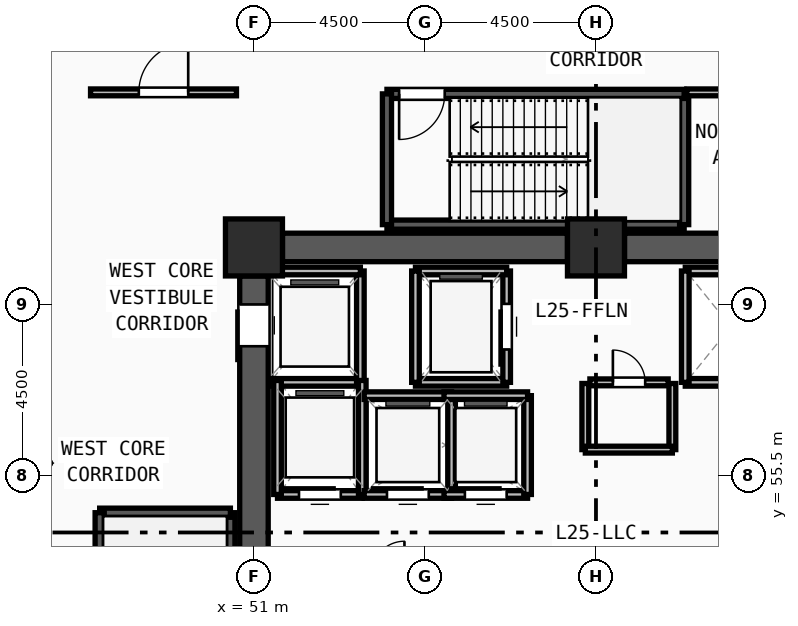
"""IFC4 building model, lengths in metres.
Left out: names, types, materials, properties, quantities, classifications, styles, units other than length and angle.
Written with IfcOpenShell. Run it as: python <this file> out.ifc"""

import sys

from ifc_helpers import new_model, si_unit, direction, frame, frame_2d, origin, origin_2d, place, context, subcontext, project, spatial, rectangle, extrude, source, transform, mapped, element, fill, save


model = new_model("IFC4")
c1 = context("Model", 3, precision=1e-05, world=origin(), true_north=direction((0.0, 1.0)))
c2 = subcontext(c1, "Body", "Model", "MODEL_VIEW")
j1 = project(units=[si_unit("LENGTHUNIT", "METRE"), si_unit("PLANEANGLEUNIT", "RADIAN")], contexts=[c1])
p1 = place(None, origin())
s1 = spatial("IfcSite", under=j1, at=p1, CompositionType="ELEMENT")
p2 = place(p1, origin())
s2 = spatial("IfcBuilding", under=s1, at=p2, CompositionType="ELEMENT")
p3 = place(p2, frame((0.0, 0.0, 97.5)))
s3 = spatial("IfcBuildingStorey", under=s2, at=p3, CompositionType="ELEMENT", Elevation=97.5)
m1 = source(origin(), c2, "Body", "SweptSolid", [
    extrude(rectangle(XDim=1.5, YDim=1.5, at=origin_2d()), origin(), (0.0, 0.0, 1.0), 4.5),
])
for number, where, z_axis, x_axis in (
    (1, (60.0, 61.5, 0.0), (0.0, 0.0, 1.0), (1.0, 0.0, 0.0)),
    (2, (51.0, 61.5, 0.0), (0.0, 0.0, 1.0), (1.0, 0.0, 0.0)),
):
    element("IfcColumn", number, at=place(p3, frame(where, z_axis=z_axis, x_axis=x_axis)), inside=s3, PredefinedType="COLUMN", context=c2, shape_type="MappedRepresentation", body=[
        mapped(m1, transform((0.0, 0.0, 0.0), x_axis=(1.0, 0.0, 0.0), y_axis=(0.0, 1.0, 0.0), z_axis=(0.0, 0.0, 1.0), scale=1.0)),
    ])
for number, where, z_axis, x_axis in (
    (3, (51.75, 61.5, 0.0), (0.0, 0.0, 1.0), (1.0, 0.0, 0.0)),
    (4, (60.75, 61.5, 0.0), (0.0, 0.0, 1.0), (1.0, 0.0, 0.0)),
):
    element("IfcWall", number, at=place(p3, frame(where, z_axis=z_axis, x_axis=x_axis)), inside=s3, PredefinedType="SHEAR", context=c2, shape_type="SweptSolid", body=[
        extrude(rectangle(XDim=7.5, YDim=0.75, at=frame_2d((3.75, 0.0))), origin(), (0.0, 0.0, 1.0), 4.32),
    ])
p4 = place(p3, frame((51.0, 47.25, 0.0), z_axis=(0.0, 0.0, 1.0), x_axis=(0.0, 1.0, 0.0)))
e5 = element("IfcWall", 5, at=p4, inside=s3, PredefinedType="SHEAR", context=c2, shape_type="SweptSolid", body=[
    extrude(rectangle(XDim=13.5, YDim=0.75, at=frame_2d((6.75, 0.0))), origin(), (0.0, 0.0, 1.0), 4.32),
])
m2 = source(origin(), c2, "Body", "SweptSolid", [
    extrude(rectangle(XDim=1.1, YDim=2.2, at=frame_2d((0.55, 1.1))), frame((0.0, 0.385, 0.0), z_axis=(0.0, -1.0, 0.0), x_axis=(1.0, 0.0, 0.0)), (0.0, 0.0, 1.0), 0.77),
])
p5 = place(p4, frame((11.65, 0.0, 0.0)))
e6 = element("IfcOpeningElement", 6, at=p5, cuts=e5, PredefinedType="OPENING", context=c2, shape_type="MappedRepresentation", body=[
    mapped(m2, transform((0.0, 0.0, 0.0), x_axis=(1.0, 0.0, 0.0), y_axis=(0.0, 1.0, 0.0), z_axis=(0.0, 0.0, 1.0), scale=1.0)),
])
p6 = place(p3, frame((50.38, 46.7, 0.0), z_axis=(0.0, 0.0, 1.0), x_axis=(0.0, 1.0, 0.0)))
e7 = element("IfcWall", 7, at=p6, inside=s3, PredefinedType="SOLIDWALL", context=c2, shape_type="SweptSolid", body=[
    extrude(rectangle(XDim=7.82, YDim=0.24, at=frame_2d((3.91, 0.0))), origin(), (0.0, 0.0, 1.0), 4.32),
])
p7 = place(p3, frame((50.38, 54.52, 0.0), z_axis=(0.0, 0.0, 1.0), x_axis=(-1.0, 0.0, 0.0)))
e8 = element("IfcWall", 8, at=p7, inside=s3, PredefinedType="SOLIDWALL", context=c2, shape_type="SweptSolid", body=[
    extrude(rectangle(XDim=3.44, YDim=0.24, at=frame_2d((1.72, 0.0))), origin(), (0.0, 0.0, 1.0), 4.32),
])
p8 = place(p3, frame((46.94, 54.52, 0.0), z_axis=(0.0, 0.0, 1.0), x_axis=(0.0, -1.0, 0.0)))
e9 = element("IfcWall", 9, at=p8, inside=s3, PredefinedType="SOLIDWALL", context=c2, shape_type="SweptSolid", body=[
    extrude(rectangle(XDim=7.82, YDim=0.24, at=frame_2d((3.91, 0.0))), origin(), (0.0, 0.0, 1.0), 4.32),
])
m3 = source(origin(), c2, "Body", "SweptSolid", [
    extrude(rectangle(XDim=1.2, YDim=2.2, at=frame_2d((0.6, 1.1))), frame((0.0, 0.13, 0.0), z_axis=(0.0, -1.0, 0.0), x_axis=(1.0, 0.0, 0.0)), (0.0, 0.0, 1.0), 0.26),
])
p9 = place(p8, frame((6.3, 0.0, 0.0)))
e10 = element("IfcOpeningElement", 10, at=p9, cuts=e9, PredefinedType="OPENING", context=c2, shape_type="MappedRepresentation", body=[
    mapped(m3, transform((0.0, 0.0, 0.0), x_axis=(1.0, 0.0, 0.0), y_axis=(0.0, 1.0, 0.0), z_axis=(0.0, 0.0, 1.0), scale=1.0)),
])
p10 = place(p3, frame((54.5, 62.1, 0.0), z_axis=(0.0, 0.0, 1.0), x_axis=(1.0, 0.0, 0.0)))
e11 = element("IfcWall", 11, at=p10, inside=s3, PredefinedType="SOLIDWALL", context=c2, shape_type="SweptSolid", body=[
    extrude(rectangle(XDim=7.82, YDim=0.24, at=frame_2d((3.91, 0.0))), origin(), (0.0, 0.0, 1.0), 4.32),
])
p11 = place(p3, frame((62.32, 62.1, 0.0), z_axis=(0.0, 0.0, 1.0), x_axis=(0.0, 1.0, 0.0)))
e12 = element("IfcWall", 12, at=p11, inside=s3, PredefinedType="SOLIDWALL", context=c2, shape_type="SweptSolid", body=[
    extrude(rectangle(XDim=3.44, YDim=0.24, at=frame_2d((1.72, 0.0))), origin(), (0.0, 0.0, 1.0), 4.32),
])
p12 = place(p3, frame((62.32, 65.54, 0.0), z_axis=(0.0, 0.0, 1.0), x_axis=(-1.0, 0.0, 0.0)))
e13 = element("IfcWall", 13, at=p12, inside=s3, PredefinedType="SOLIDWALL", context=c2, shape_type="SweptSolid", body=[
    extrude(rectangle(XDim=7.82, YDim=0.24, at=frame_2d((3.91, 0.0))), origin(), (0.0, 0.0, 1.0), 4.32),
])
p13 = place(p12, frame((6.3, 0.0, 0.0)))
e14 = element("IfcOpeningElement", 14, at=p13, cuts=e13, PredefinedType="OPENING", context=c2, shape_type="MappedRepresentation", body=[
    mapped(m3, transform((0.0, 0.0, 0.0), x_axis=(1.0, 0.0, 0.0), y_axis=(0.0, 1.0, 0.0), z_axis=(0.0, 0.0, 1.0), scale=1.0)),
])
p14 = place(p3, frame((54.5, 65.54, 0.0), z_axis=(0.0, 0.0, 1.0), x_axis=(0.0, -1.0, 0.0)))
e15 = element("IfcWall", 15, at=p14, inside=s3, PredefinedType="SOLIDWALL", context=c2, shape_type="SweptSolid", body=[
    extrude(rectangle(XDim=3.44, YDim=0.24, at=frame_2d((1.72, 0.0))), origin(), (0.0, 0.0, 1.0), 4.32),
])
p15 = place(p3, frame((55.25, 57.95, 0.0), z_axis=(0.0, 0.0, 1.0), x_axis=(1.0, 0.0, 0.0)))
e16 = element("IfcWall", 16, at=p15, inside=s3, PredefinedType="SOLIDWALL", context=c2, shape_type="SweptSolid", body=[
    extrude(rectangle(XDim=2.4, YDim=0.2, at=frame_2d((1.2, 0.0))), origin(), (0.0, 0.0, 1.0), 4.32),
])
p16 = place(p3, frame((57.65, 57.95, 0.0), z_axis=(0.0, 0.0, 1.0), x_axis=(0.0, 1.0, 0.0)))
e17 = element("IfcWall", 17, at=p16, inside=s3, PredefinedType="SOLIDWALL", context=c2, shape_type="SweptSolid", body=[
    extrude(rectangle(XDim=2.93, YDim=0.2, at=frame_2d((1.465, 0.0))), origin(), (0.0, 0.0, 1.0), 4.32),
])
m4 = source(origin(), c2, "Body", "SweptSolid", [
    extrude(rectangle(XDim=1.2, YDim=2.3, at=frame_2d((0.6, 1.15))), frame((0.0, 0.11, 0.0), z_axis=(0.0, -1.0, 0.0), x_axis=(1.0, 0.0, 0.0)), (0.0, 0.0, 1.0), 0.22),
])
p17 = place(p16, frame((0.865, 0.0, 0.0)))
e18 = element("IfcOpeningElement", 18, at=p17, cuts=e17, PredefinedType="OPENING", context=c2, shape_type="MappedRepresentation", body=[
    mapped(m4, transform((0.0, 0.0, 0.0), x_axis=(1.0, 0.0, 0.0), y_axis=(0.0, 1.0, 0.0), z_axis=(0.0, 0.0, 1.0), scale=1.0)),
])
p18 = place(p3, frame((57.65, 60.88, 0.0), z_axis=(0.0, 0.0, 1.0), x_axis=(-1.0, 0.0, 0.0)))
e19 = element("IfcWall", 19, at=p18, inside=s3, PredefinedType="SOLIDWALL", context=c2, shape_type="SweptSolid", body=[
    extrude(rectangle(XDim=2.4, YDim=0.2, at=frame_2d((1.2, 0.0))), origin(), (0.0, 0.0, 1.0), 4.32),
])
p19 = place(p3, frame((55.25, 60.88, 0.0), z_axis=(0.0, 0.0, 1.0), x_axis=(0.0, -1.0, 0.0)))
e20 = element("IfcWall", 20, at=p19, inside=s3, PredefinedType="SOLIDWALL", context=c2, shape_type="SweptSolid", body=[
    extrude(rectangle(XDim=2.93, YDim=0.2, at=frame_2d((1.465, 0.0))), origin(), (0.0, 0.0, 1.0), 4.32),
])
for number, where, z_axis, x_axis in (
    (21, (62.35, 57.95, 0.0), (0.0, 0.0, 1.0), (1.0, 0.0, 0.0)),
    (22, (64.75, 60.88, 0.0), (0.0, 0.0, 1.0), (-1.0, 0.0, 0.0)),
):
    element("IfcWall", number, at=place(p3, frame(where, z_axis=z_axis, x_axis=x_axis)), inside=s3, PredefinedType="SOLIDWALL", context=c2, shape_type="SweptSolid", body=[
        extrude(rectangle(XDim=2.4, YDim=0.2, at=frame_2d((1.2, 0.0))), origin(), (0.0, 0.0, 1.0), 4.32),
    ])
p20 = place(p3, frame((62.35, 60.88, 0.0), z_axis=(0.0, 0.0, 1.0), x_axis=(0.0, -1.0, 0.0)))
e23 = element("IfcWall", 23, at=p20, inside=s3, PredefinedType="SOLIDWALL", context=c2, shape_type="SweptSolid", body=[
    extrude(rectangle(XDim=2.93, YDim=0.2, at=frame_2d((1.465, 0.0))), origin(), (0.0, 0.0, 1.0), 4.32),
])
p21 = place(p3, frame((51.4, 57.95, 0.0), z_axis=(0.0, 0.0, 1.0), x_axis=(1.0, 0.0, 0.0)))
e24 = element("IfcWall", 24, at=p21, inside=s3, PredefinedType="SOLIDWALL", context=c2, shape_type="SweptSolid", body=[
    extrude(rectangle(XDim=2.4, YDim=0.2, at=frame_2d((1.2, 0.0))), origin(), (0.0, 0.0, 1.0), 4.32),
])
p22 = place(p3, frame((53.8, 57.95, 0.0), z_axis=(0.0, 0.0, 1.0), x_axis=(0.0, 1.0, 0.0)))
e25 = element("IfcWall", 25, at=p22, inside=s3, PredefinedType="SOLIDWALL", context=c2, shape_type="SweptSolid", body=[
    extrude(rectangle(XDim=2.93, YDim=0.2, at=frame_2d((1.465, 0.0))), origin(), (0.0, 0.0, 1.0), 4.32),
])
p23 = place(p3, frame((53.8, 60.88, 0.0), z_axis=(0.0, 0.0, 1.0), x_axis=(-1.0, 0.0, 0.0)))
e26 = element("IfcWall", 26, at=p23, inside=s3, PredefinedType="SOLIDWALL", context=c2, shape_type="SweptSolid", body=[
    extrude(rectangle(XDim=2.4, YDim=0.2, at=frame_2d((1.2, 0.0))), origin(), (0.0, 0.0, 1.0), 4.32),
])
p24 = place(p3, frame((51.62, 55.0, 0.0), z_axis=(0.0, 0.0, 1.0), x_axis=(1.0, 0.0, 0.0)))
e27 = element("IfcWall", 27, at=p24, inside=s3, PredefinedType="SOLIDWALL", context=c2, shape_type="SweptSolid", body=[
    extrude(rectangle(XDim=2.23, YDim=0.2, at=frame_2d((1.115, 0.0))), origin(), (0.0, 0.0, 1.0), 4.32),
])
m5 = source(origin(), c2, "Body", "SweptSolid", [
    extrude(rectangle(XDim=1.1, YDim=2.2, at=frame_2d((0.55, 1.1))), frame((0.0, 0.11, 0.0), z_axis=(0.0, -1.0, 0.0), x_axis=(1.0, 0.0, 0.0)), (0.0, 0.0, 1.0), 0.22),
])
p25 = place(p24, frame((0.565, 0.0, 0.0)))
e28 = element("IfcOpeningElement", 28, at=p25, cuts=e27, PredefinedType="OPENING", context=c2, shape_type="MappedRepresentation", body=[
    mapped(m5, transform((0.0, 0.0, 0.0), x_axis=(1.0, 0.0, 0.0), y_axis=(0.0, 1.0, 0.0), z_axis=(0.0, 0.0, 1.0), scale=1.0)),
])
for number, where, z_axis, x_axis in (
    (29, (53.85, 55.0, 0.0), (0.0, 0.0, 1.0), (0.0, 1.0, 0.0)),
    (30, (51.62, 58.0, 0.0), (0.0, 0.0, 1.0), (0.0, -1.0, 0.0)),
):
    element("IfcWall", number, at=place(p3, frame(where, z_axis=z_axis, x_axis=x_axis)), inside=s3, PredefinedType="SOLIDWALL", context=c2, shape_type="SweptSolid", body=[
        extrude(rectangle(XDim=3.0, YDim=0.2, at=frame_2d((1.5, 0.0))), origin(), (0.0, 0.0, 1.0), 4.32),
    ])
p26 = place(p3, frame((53.9, 55.0, 0.0), z_axis=(0.0, 0.0, 1.0), x_axis=(1.0, 0.0, 0.0)))
e31 = element("IfcWall", 31, at=p26, inside=s3, PredefinedType="SOLIDWALL", context=c2, shape_type="SweptSolid", body=[
    extrude(rectangle(XDim=2.3, YDim=0.2, at=frame_2d((1.15, 0.0))), origin(), (0.0, 0.0, 1.0), 4.32),
])
p27 = place(p26, frame((0.6, 0.0, 0.0)))
e32 = element("IfcOpeningElement", 32, at=p27, cuts=e31, PredefinedType="OPENING", context=c2, shape_type="MappedRepresentation", body=[
    mapped(m5, transform((0.0, 0.0, 0.0), x_axis=(1.0, 0.0, 0.0), y_axis=(0.0, 1.0, 0.0), z_axis=(0.0, 0.0, 1.0), scale=1.0)),
])
p28 = place(p3, frame((56.2, 55.0, 0.0), z_axis=(0.0, 0.0, 1.0), x_axis=(0.0, 1.0, 0.0)))
e33 = element("IfcWall", 33, at=p28, inside=s3, PredefinedType="SOLIDWALL", context=c2, shape_type="SweptSolid", body=[
    extrude(rectangle(XDim=2.6, YDim=0.2, at=frame_2d((1.3, 0.0))), origin(), (0.0, 0.0, 1.0), 4.32),
])
p29 = place(p3, frame((56.2, 57.6, 0.0), z_axis=(0.0, 0.0, 1.0), x_axis=(-1.0, 0.0, 0.0)))
e34 = element("IfcWall", 34, at=p29, inside=s3, PredefinedType="SOLIDWALL", context=c2, shape_type="SweptSolid", body=[
    extrude(rectangle(XDim=2.3, YDim=0.2, at=frame_2d((1.15, 0.0))), origin(), (0.0, 0.0, 1.0), 4.32),
])
p30 = place(p3, frame((56.0, 55.0, 0.0), z_axis=(0.0, 0.0, 1.0), x_axis=(1.0, 0.0, 0.0)))
e35 = element("IfcWall", 35, at=p30, inside=s3, PredefinedType="SOLIDWALL", context=c2, shape_type="SweptSolid", body=[
    extrude(rectangle(XDim=2.2, YDim=0.2, at=frame_2d((1.1, 0.0))), origin(), (0.0, 0.0, 1.0), 4.32),
])
p31 = place(p30, frame((0.55, 0.0, 0.0)))
e36 = element("IfcOpeningElement", 36, at=p31, cuts=e35, PredefinedType="OPENING", context=c2, shape_type="MappedRepresentation", body=[
    mapped(m5, transform((0.0, 0.0, 0.0), x_axis=(1.0, 0.0, 0.0), y_axis=(0.0, 1.0, 0.0), z_axis=(0.0, 0.0, 1.0), scale=1.0)),
])
p32 = place(p3, frame((58.2, 55.0, 0.0), z_axis=(0.0, 0.0, 1.0), x_axis=(0.0, 1.0, 0.0)))
e37 = element("IfcWall", 37, at=p32, inside=s3, PredefinedType="SOLIDWALL", context=c2, shape_type="SweptSolid", body=[
    extrude(rectangle(XDim=2.6, YDim=0.2, at=frame_2d((1.3, 0.0))), origin(), (0.0, 0.0, 1.0), 4.32),
])
p33 = place(p3, frame((58.2, 57.6, 0.0), z_axis=(0.0, 0.0, 1.0), x_axis=(-1.0, 0.0, 0.0)))
e38 = element("IfcWall", 38, at=p33, inside=s3, PredefinedType="SOLIDWALL", context=c2, shape_type="SweptSolid", body=[
    extrude(rectangle(XDim=2.2, YDim=0.2, at=frame_2d((1.1, 0.0))), origin(), (0.0, 0.0, 1.0), 4.32),
])
p34 = place(p3, frame((59.84, 57.95, 0.0), z_axis=(0.0, 0.0, 1.0), x_axis=(1.0, 0.0, 0.0)))
e39 = element("IfcWall", 39, at=p34, inside=s3, PredefinedType="PARTITIONING", context=c2, shape_type="SweptSolid", body=[
    extrude(rectangle(XDim=2.06, YDim=0.18, at=frame_2d((1.03, 0.0))), origin(), (0.0, 0.0, 1.0), 4.32),
])
m6 = source(origin(), c2, "Body", "SweptSolid", [
    extrude(rectangle(XDim=0.85, YDim=2.1, at=frame_2d((0.425, 1.05))), frame((0.0, 0.1, 0.0), z_axis=(0.0, -1.0, 0.0), x_axis=(1.0, 0.0, 0.0)), (0.0, 0.0, 1.0), 0.2),
])
p35 = place(p34, frame((0.605, 0.0, 0.0)))
e40 = element("IfcOpeningElement", 40, at=p35, cuts=e39, PredefinedType="OPENING", context=c2, shape_type="MappedRepresentation", body=[
    mapped(m6, transform((0.0, 0.0, 0.0), x_axis=(1.0, 0.0, 0.0), y_axis=(0.0, 1.0, 0.0), z_axis=(0.0, 0.0, 1.0), scale=1.0)),
])
p36 = place(p3, frame((62.39, 65.58, 0.0), z_axis=(0.0, 0.0, 1.0), x_axis=(1.0, 0.0, 0.0)))
e41 = element("IfcWall", 41, at=p36, inside=s3, PredefinedType="PARTITIONING", context=c2, shape_type="SweptSolid", body=[
    extrude(rectangle(XDim=3.49, YDim=0.18, at=frame_2d((1.745, 0.0))), origin(), (0.0, 0.0, 1.0), 4.32),
])
m7 = source(origin(), c2, "Body", "SweptSolid", [
    extrude(rectangle(XDim=1.0, YDim=2.2, at=frame_2d((0.5, 1.1))), frame((0.0, 0.1, 0.0), z_axis=(0.0, -1.0, 0.0), x_axis=(1.0, 0.0, 0.0)), (0.0, 0.0, 1.0), 0.2),
])
p37 = place(p36, frame((1.245, 0.0, 0.0)))
e42 = element("IfcOpeningElement", 42, at=p37, cuts=e41, PredefinedType="OPENING", context=c2, shape_type="MappedRepresentation", body=[
    mapped(m7, transform((0.0, 0.0, 0.0), x_axis=(1.0, 0.0, 0.0), y_axis=(0.0, 1.0, 0.0), z_axis=(0.0, 0.0, 1.0), scale=1.0)),
])
p38 = place(p3, frame((46.7, 65.58, 0.0), z_axis=(0.0, 0.0, 1.0), x_axis=(1.0, 0.0, 0.0)))
e43 = element("IfcWall", 43, at=p38, inside=s3, PredefinedType="PARTITIONING", context=c2, shape_type="SweptSolid", body=[
    extrude(rectangle(XDim=3.84, YDim=0.18, at=frame_2d((1.92, 0.0))), origin(), (0.0, 0.0, 1.0), 4.32),
])
m8 = source(origin(), c2, "Body", "SweptSolid", [
    extrude(rectangle(XDim=1.3, YDim=2.2, at=frame_2d((0.65, 1.1))), frame((0.0, 0.1, 0.0), z_axis=(0.0, -1.0, 0.0), x_axis=(1.0, 0.0, 0.0)), (0.0, 0.0, 1.0), 0.2),
])
p39 = place(p38, frame((1.27, 0.0, 0.0)))
e44 = element("IfcOpeningElement", 44, at=p39, cuts=e43, PredefinedType="OPENING", context=c2, shape_type="MappedRepresentation", body=[
    mapped(m8, transform((0.0, 0.0, 0.0), x_axis=(1.0, 0.0, 0.0), y_axis=(0.0, 1.0, 0.0), z_axis=(0.0, 0.0, 1.0), scale=1.0)),
])
for number, where, z_axis, x_axis in (
    (45, (59.72, 56.18, 0.0), (0.0, 0.0, 1.0), (0.0, 1.0, 0.0)),
    (46, (62.01, 56.18, 0.0), (0.0, 0.0, 1.0), (0.0, 1.0, 0.0)),
):
    element("IfcWall", number, at=place(p3, frame(where, z_axis=z_axis, x_axis=x_axis)), inside=s3, PredefinedType="PARTITIONING", context=c2, shape_type="SweptSolid", body=[
        extrude(rectangle(XDim=1.74, YDim=0.18, at=frame_2d((0.87, 0.0))), origin(), (0.0, 0.0, 1.0), 4.32),
    ])
p40 = place(p3, frame((59.72, 56.18, 0.0), z_axis=(0.0, 0.0, 1.0), x_axis=(1.0, 0.0, 0.0)))
e47 = element("IfcWall", 47, at=p40, inside=s3, PredefinedType="PARTITIONING", context=c2, shape_type="SweptSolid", body=[
    extrude(rectangle(XDim=2.29, YDim=0.18, at=frame_2d((1.145, 0.0))), origin(), (0.0, 0.0, 1.0), 4.32),
])
m9 = source(origin(), c2, "Body", "SweptSolid", [
    extrude(rectangle(XDim=1.2, YDim=2.2, at=frame_2d((0.6, 1.1))), frame((0.0, 0.025, 0.0), z_axis=(0.0, -1.0, 0.0), x_axis=(1.0, 0.0, 0.0)), (0.0, 0.0, 1.0), 0.05),
])
p41 = place(p13, origin())
e48 = element("IfcDoor", 48, at=p41, inside=s3, OperationType="SINGLE_SWING_RIGHT", PredefinedType="DOOR", context=c2, shape_type="MappedRepresentation", body=[
    mapped(m9, transform((0.0, 0.0, 0.0), x_axis=(1.0, 0.0, 0.0), y_axis=(0.0, 1.0, 0.0), z_axis=(0.0, 0.0, 1.0), scale=1.0)),
])
fill(e14, e48)
m10 = source(origin(), c2, "Body", "SweptSolid", [
    extrude(rectangle(XDim=1.2, YDim=2.3, at=frame_2d((0.6, 1.15))), frame((0.0, 0.025, 0.0), z_axis=(0.0, -1.0, 0.0), x_axis=(1.0, 0.0, 0.0)), (0.0, 0.0, 1.0), 0.05),
])
p42 = place(p17, origin())
e49 = element("IfcDoor", 49, at=p42, inside=s3, OperationType="SLIDING_TO_LEFT", PredefinedType="DOOR", context=c2, shape_type="MappedRepresentation", body=[
    mapped(m10, transform((0.0, 0.0, 0.0), x_axis=(1.0, 0.0, 0.0), y_axis=(0.0, 1.0, 0.0), z_axis=(0.0, 0.0, 1.0), scale=1.0)),
])
fill(e18, e49)
m11 = source(origin(), c2, "Body", "SweptSolid", [
    extrude(rectangle(XDim=1.1, YDim=2.2, at=frame_2d((0.55, 1.1))), frame((0.0, 0.025, 0.0), z_axis=(0.0, -1.0, 0.0), x_axis=(1.0, 0.0, 0.0)), (0.0, 0.0, 1.0), 0.05),
])
p43 = place(p5, origin())
e50 = element("IfcDoor", 50, at=p43, inside=s3, OperationType="SLIDING_TO_LEFT", PredefinedType="DOOR", context=c2, shape_type="MappedRepresentation", body=[
    mapped(m11, transform((0.0, 0.0, 0.0), x_axis=(1.0, 0.0, 0.0), y_axis=(0.0, 1.0, 0.0), z_axis=(0.0, 0.0, 1.0), scale=1.0)),
])
fill(e6, e50)
p44 = place(p25, origin())
e51 = element("IfcDoor", 51, at=p44, inside=s3, OperationType="SLIDING_TO_LEFT", PredefinedType="DOOR", context=c2, shape_type="MappedRepresentation", body=[
    mapped(m11, transform((0.0, 0.0, 0.0), x_axis=(1.0, 0.0, 0.0), y_axis=(0.0, 1.0, 0.0), z_axis=(0.0, 0.0, 1.0), scale=1.0)),
])
fill(e28, e51)
p45 = place(p27, origin())
e52 = element("IfcDoor", 52, at=p45, inside=s3, OperationType="SLIDING_TO_LEFT", PredefinedType="DOOR", context=c2, shape_type="MappedRepresentation", body=[
    mapped(m11, transform((0.0, 0.0, 0.0), x_axis=(1.0, 0.0, 0.0), y_axis=(0.0, 1.0, 0.0), z_axis=(0.0, 0.0, 1.0), scale=1.0)),
])
fill(e32, e52)
p46 = place(p31, origin())
e53 = element("IfcDoor", 53, at=p46, inside=s3, OperationType="SLIDING_TO_LEFT", PredefinedType="DOOR", context=c2, shape_type="MappedRepresentation", body=[
    mapped(m11, transform((0.0, 0.0, 0.0), x_axis=(1.0, 0.0, 0.0), y_axis=(0.0, 1.0, 0.0), z_axis=(0.0, 0.0, 1.0), scale=1.0)),
])
fill(e36, e53)
m12 = source(origin(), c2, "Body", "SweptSolid", [
    extrude(rectangle(XDim=0.85, YDim=2.1, at=frame_2d((0.425, 1.05))), frame((0.0, 0.025, 0.0), z_axis=(0.0, -1.0, 0.0), x_axis=(1.0, 0.0, 0.0)), (0.0, 0.0, 1.0), 0.05),
])
p47 = place(p35, origin())
e54 = element("IfcDoor", 54, at=p47, inside=s3, OperationType="SINGLE_SWING_LEFT", PredefinedType="DOOR", context=c2, shape_type="MappedRepresentation", body=[
    mapped(m12, transform((0.0, 0.0, 0.0), x_axis=(1.0, 0.0, 0.0), y_axis=(0.0, 1.0, 0.0), z_axis=(0.0, 0.0, 1.0), scale=1.0)),
])
fill(e40, e54)
m13 = source(origin(), c2, "Body", "SweptSolid", [
    extrude(rectangle(XDim=1.3, YDim=2.2, at=frame_2d((0.65, 1.1))), frame((0.0, 0.025, 0.0), z_axis=(0.0, -1.0, 0.0), x_axis=(1.0, 0.0, 0.0)), (0.0, 0.0, 1.0), 0.05),
])
p48 = place(p39, origin())
e55 = element("IfcDoor", 55, at=p48, inside=s3, OperationType="SINGLE_SWING_RIGHT", PredefinedType="DOOR", context=c2, shape_type="MappedRepresentation", body=[
    mapped(m13, transform((0.0, 0.0, 0.0), x_axis=(1.0, 0.0, 0.0), y_axis=(0.0, 1.0, 0.0), z_axis=(0.0, 0.0, 1.0), scale=1.0)),
])
fill(e44, e55)
save(model, sys.argv[1])
